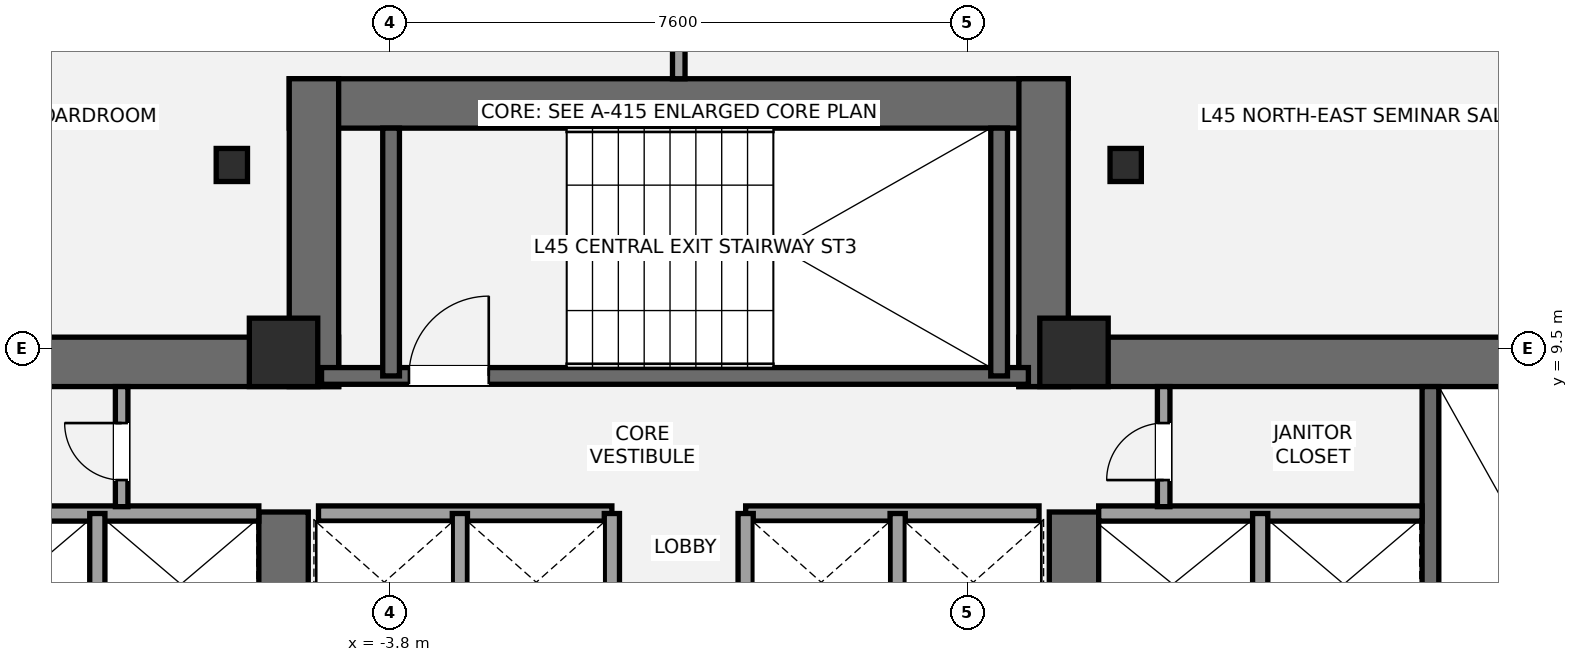
"""IFC4 building model, lengths in metres.
Left out: names, types, materials, properties, quantities, classifications, styles, units other than length and angle.
Written with IfcOpenShell. Run it as: python <this file> out.ifc"""

import sys

from ifc_helpers import new_model, si_unit, direction, frame, frame_2d, origin, origin_2d, place, context, subcontext, project, spatial, rectangle, i_section, extrude, element, fill, save


model = new_model("IFC4")
c1 = context("Model", 3, precision=1e-05, world=origin(), true_north=direction((0.0, 1.0)))
c2 = subcontext(c1, "Body", "Model", "MODEL_VIEW")
j1 = project(units=[si_unit("LENGTHUNIT", "METRE"), si_unit("PLANEANGLEUNIT", "RADIAN")], contexts=[c1])
p1 = place(None, origin())
s1 = spatial("IfcSite", under=j1, at=p1, CompositionType="ELEMENT")
p2 = place(p1, origin())
s2 = spatial("IfcBuilding", under=s1, at=p2, CompositionType="ELEMENT")
p3 = place(p2, frame((0.0, 0.0, 166.2)))
s3 = spatial("IfcBuildingStorey", under=s2, at=p3, CompositionType="ELEMENT", Elevation=166.2)
p4 = place(p3, frame((-13.8, 9.325, 0.0), z_axis=(0.0, 0.0, 1.0), x_axis=(1.0, 0.0, 0.0)))
e1 = element("IfcWall", 1, at=p4, inside=s3, PredefinedType="SHEAR", context=c2, shape_type="SweptSolid", body=[
    extrude(rectangle(XDim=9.325, YDim=0.65, at=frame_2d((4.663, 0.0))), origin(), (0.0, 0.0, 1.0), 3.2),
])
p5 = place(p3, frame((-5.2, 5.35, 0.0), z_axis=(0.0, 0.0, 1.0), x_axis=(0.0, 1.0, 0.0)))
e2 = element("IfcWall", 2, at=p5, inside=s3, PredefinedType="SHEAR", context=c2, shape_type="SweptSolid", body=[
    extrude(rectangle(XDim=2.0, YDim=0.65, at=frame_2d((1.0, 0.0))), origin(), (0.0, 0.0, 1.0), 3.2),
])
p6 = place(p3, frame((4.475, 9.325, 0.0), z_axis=(0.0, 0.0, 1.0), x_axis=(1.0, 0.0, 0.0)))
e3 = element("IfcWall", 3, at=p6, inside=s3, PredefinedType="SHEAR", context=c2, shape_type="SweptSolid", body=[
    extrude(rectangle(XDim=9.325, YDim=0.65, at=frame_2d((4.663, 0.0))), origin(), (0.0, 0.0, 1.0), 3.2),
])
p7 = place(p3, frame((5.2, 5.35, 0.0), z_axis=(0.0, 0.0, 1.0), x_axis=(0.0, 1.0, 0.0)))
e4 = element("IfcWall", 4, at=p7, inside=s3, PredefinedType="SHEAR", context=c2, shape_type="SweptSolid", body=[
    extrude(rectangle(XDim=2.0, YDim=0.65, at=frame_2d((1.0, 0.0))), origin(), (0.0, 0.0, 1.0), 3.2),
])
p8 = place(p3, frame((9.89, 1.85, 0.0), z_axis=(0.0, 0.0, 1.0), x_axis=(0.0, 1.0, 0.0)))
e5 = element("IfcWall", 5, at=p8, inside=s3, PredefinedType="SHEAR", context=c2, shape_type="SweptSolid", body=[
    extrude(rectangle(XDim=7.15, YDim=0.22, at=frame_2d((3.575, 0.0))), origin(), (0.0, 0.0, 1.0), 3.2),
])
p9 = place(p3, frame((-5.125, 12.725, 0.0), z_axis=(0.0, 0.0, 1.0), x_axis=(1.0, 0.0, 0.0)))
e6 = element("IfcWall", 6, at=p9, inside=s3, PredefinedType="SHEAR", context=c2, shape_type="SweptSolid", body=[
    extrude(rectangle(XDim=10.25, YDim=0.65, at=frame_2d((5.125, 0.0))), origin(), (0.0, 0.0, 1.0), 3.2),
])
for number, where, z_axis, x_axis in (
    (7, (-4.8, 9.0, 0.0), (0.0, 0.0, 1.0), (0.0, 1.0, 0.0)),
    (8, (4.8, 9.0, 0.0), (0.0, 0.0, 1.0), (0.0, 1.0, 0.0)),
):
    element("IfcWall", number, at=place(p3, frame(where, z_axis=z_axis, x_axis=x_axis)), inside=s3, PredefinedType="SHEAR", context=c2, shape_type="SweptSolid", body=[
        extrude(rectangle(XDim=4.05, YDim=0.65, at=frame_2d((2.025, 0.0))), origin(), (0.0, 0.0, 1.0), 3.2),
    ])
p10 = place(p3, frame((-4.7, 9.14, 0.0), z_axis=(0.0, 0.0, 1.0), x_axis=(1.0, 0.0, 0.0)))
e9 = element("IfcWall", 9, at=p10, inside=s3, PredefinedType="SHEAR", context=c2, shape_type="SweptSolid", body=[
    extrude(rectangle(XDim=9.3, YDim=0.22, at=frame_2d((4.65, 0.0))), origin(), (0.0, 0.0, 1.0), 3.2),
])
p11 = place(p10, frame((1.15, 0.0, 0.0)))
e10 = element("IfcOpeningElement", 10, at=p11, cuts=e9, PredefinedType="OPENING", context=c2, shape_type="SweptSolid", body=[
    extrude(rectangle(XDim=1.05, YDim=2.15, at=frame_2d((0.525, 1.075))), frame((0.0, 0.12, 0.0), z_axis=(0.0, -1.0, 0.0), x_axis=(1.0, 0.0, 0.0)), (0.0, 0.0, 1.0), 0.24),
])
for number, where, z_axis, x_axis in (
    (11, (-3.785, 9.14, 0.0), (0.0, 0.0, 1.0), (0.0, 1.0, 0.0)),
    (12, (4.215, 9.14, 0.0), (0.0, 0.0, 1.0), (0.0, 1.0, 0.0)),
):
    element("IfcWall", number, at=place(p3, frame(where, z_axis=z_axis, x_axis=x_axis)), inside=s3, PredefinedType="SHEAR", context=c2, shape_type="SweptSolid", body=[
        extrude(rectangle(XDim=3.26, YDim=0.22, at=frame_2d((1.63, 0.0))), origin(), (0.0, 0.0, 1.0), 3.2),
    ])
for number, where, z_axis, x_axis in (
    (13, (-5.2, 9.45, 0.0), (0.0, 0.0, 1.0), (1.0, 0.0, 0.0)),
    (14, (5.2, 9.45, 0.0), (0.0, 0.0, 1.0), (1.0, 0.0, 0.0)),
):
    element("IfcColumn", number, at=place(p3, frame(where, z_axis=z_axis, x_axis=x_axis)), inside=s3, PredefinedType="COLUMN", context=c2, shape_type="SweptSolid", body=[
        extrude(rectangle(XDim=0.9, YDim=0.9, at=origin_2d()), origin(), (0.0, 0.0, 1.0), 3.2),
    ])
for number, where, z_axis, x_axis in (
    (15, (5.88, 11.915, 0.0), (0.0, 0.0, 1.0), (1.0, 0.0, 0.0)),
    (16, (-5.88, 11.915, 0.0), (0.0, 0.0, 1.0), (1.0, 0.0, 0.0)),
):
    element("IfcColumn", number, at=place(p3, frame(where, z_axis=z_axis, x_axis=x_axis)), inside=s3, PredefinedType="COLUMN", context=c2, shape_type="SweptSolid", body=[
        extrude(i_section(OverallWidth=0.412, OverallDepth=0.435, WebThickness=0.036, FlangeThickness=0.057, at=origin_2d()), origin(), (0.0, 0.0, 1.0), 3.2),
    ])
p12 = place(p3, frame((-9.78, 7.33, 0.0), z_axis=(0.0, 0.0, 1.0), x_axis=(1.0, 0.0, 0.0)))
e17 = element("IfcWall", 17, at=p12, inside=s3, PredefinedType="SOLIDWALL", context=c2, shape_type="SweptSolid", body=[
    extrude(rectangle(XDim=4.255, YDim=0.2, at=frame_2d((2.127, 0.0))), origin(), (0.0, 0.0, 1.0), 3.02),
])
p13 = place(p3, frame((-7.65, 5.47, 0.0), z_axis=(0.0, 0.0, 1.0), x_axis=(0.0, 1.0, 0.0)))
e18 = element("IfcWall", 18, at=p13, inside=s3, PredefinedType="SOLIDWALL", context=c2, shape_type="SweptSolid", body=[
    extrude(rectangle(XDim=1.86, YDim=0.2, at=frame_2d((0.93, 0.0))), origin(), (0.0, 0.0, 1.0), 3.02),
])
p14 = place(p3, frame((5.525, 7.33, 0.0), z_axis=(0.0, 0.0, 1.0), x_axis=(1.0, 0.0, 0.0)))
e19 = element("IfcWall", 19, at=p14, inside=s3, PredefinedType="SOLIDWALL", context=c2, shape_type="SweptSolid", body=[
    extrude(rectangle(XDim=4.255, YDim=0.2, at=frame_2d((2.127, 0.0))), origin(), (0.0, 0.0, 1.0), 3.02),
])
p15 = place(p3, frame((7.65, 5.47, 0.0), z_axis=(0.0, 0.0, 1.0), x_axis=(0.0, 1.0, 0.0)))
e20 = element("IfcWall", 20, at=p15, inside=s3, PredefinedType="SOLIDWALL", context=c2, shape_type="SweptSolid", body=[
    extrude(rectangle(XDim=1.86, YDim=0.2, at=frame_2d((0.93, 0.0))), origin(), (0.0, 0.0, 1.0), 3.02),
])
for number, where, z_axis, x_axis in (
    (21, (-4.74, 7.33, 0.0), (0.0, 0.0, 1.0), (1.0, 0.0, 0.0)),
    (22, (0.88, 7.33, 0.0), (0.0, 0.0, 1.0), (1.0, 0.0, 0.0)),
):
    element("IfcWall", number, at=place(p3, frame(where, z_axis=z_axis, x_axis=x_axis)), inside=s3, PredefinedType="SOLIDWALL", context=c2, shape_type="SweptSolid", body=[
        extrude(rectangle(XDim=3.86, YDim=0.2, at=frame_2d((1.93, 0.0))), origin(), (0.0, 0.0, 1.0), 3.02),
    ])
for number, where, z_axis, x_axis in (
    (23, (-2.88, 5.52, 0.0), (0.0, 0.0, 1.0), (0.0, 1.0, 0.0)),
    (24, (2.88, 5.52, 0.0), (0.0, 0.0, 1.0), (0.0, 1.0, 0.0)),
    (25, (-0.88, 5.52, 0.0), (0.0, 0.0, 1.0), (0.0, 1.0, 0.0)),
    (26, (0.88, 5.52, 0.0), (0.0, 0.0, 1.0), (0.0, 1.0, 0.0)),
):
    element("IfcWall", number, at=place(p3, frame(where, z_axis=z_axis, x_axis=x_axis)), inside=s3, PredefinedType="SOLIDWALL", context=c2, shape_type="SweptSolid", body=[
        extrude(rectangle(XDim=1.81, YDim=0.2, at=frame_2d((0.905, 0.0))), origin(), (0.0, 0.0, 1.0), 3.02),
    ])
p16 = place(p3, frame((-7.33, 7.42, 0.0), z_axis=(0.0, 0.0, 1.0), x_axis=(0.0, 1.0, 0.0)))
e27 = element("IfcWall", 27, at=p16, inside=s3, PredefinedType="PARTITIONING", context=c2, shape_type="SweptSolid", body=[
    extrude(rectangle(XDim=1.58, YDim=0.165, at=frame_2d((0.79, 0.0))), origin(), (0.0, 0.0, 1.0), 3.02),
])
p17 = place(p16, frame((0.35, 0.0, 0.0)))
e28 = element("IfcOpeningElement", 28, at=p17, cuts=e27, PredefinedType="OPENING", context=c2, shape_type="SweptSolid", body=[
    extrude(rectangle(XDim=0.75, YDim=2.1, at=frame_2d((0.375, 1.05))), frame((0.0, 0.093, 0.0), z_axis=(0.0, -1.0, 0.0), x_axis=(1.0, 0.0, 0.0)), (0.0, 0.0, 1.0), 0.185),
])
p18 = place(p3, frame((6.38, 7.42, 0.0), z_axis=(0.0, 0.0, 1.0), x_axis=(0.0, 1.0, 0.0)))
e29 = element("IfcWall", 29, at=p18, inside=s3, PredefinedType="PARTITIONING", context=c2, shape_type="SweptSolid", body=[
    extrude(rectangle(XDim=1.58, YDim=0.165, at=frame_2d((0.79, 0.0))), origin(), (0.0, 0.0, 1.0), 3.02),
])
p19 = place(p18, frame((0.35, 0.0, 0.0)))
e30 = element("IfcOpeningElement", 30, at=p19, cuts=e29, PredefinedType="OPENING", context=c2, shape_type="SweptSolid", body=[
    extrude(rectangle(XDim=0.75, YDim=2.1, at=frame_2d((0.375, 1.05))), frame((0.0, 0.093, 0.0), z_axis=(0.0, -1.0, 0.0), x_axis=(1.0, 0.0, 0.0)), (0.0, 0.0, 1.0), 0.185),
])
p20 = place(p3, frame((0.0, 13.05, 0.0), z_axis=(0.0, 0.0, 1.0), x_axis=(0.0, 1.0, 0.0)))
e31 = element("IfcWall", 31, at=p20, inside=s3, PredefinedType="PARTITIONING", context=c2, shape_type="SweptSolid", body=[
    extrude(rectangle(XDim=3.29, YDim=0.165, at=frame_2d((1.645, 0.0))), origin(), (0.0, 0.0, 1.0), 3.02),
])
p21 = place(p11, origin())
e32 = element("IfcDoor", 32, at=p21, inside=s3, OperationType="SINGLE_SWING_RIGHT", PredefinedType="DOOR", context=c2, shape_type="SweptSolid", body=[
    extrude(rectangle(XDim=1.05, YDim=2.15, at=frame_2d((0.525, 1.075))), frame((0.0, 0.025, 0.0), z_axis=(0.0, -1.0, 0.0), x_axis=(1.0, 0.0, 0.0)), (0.0, 0.0, 1.0), 0.05),
])
fill(e10, e32)
p22 = place(p17, origin())
e33 = element("IfcDoor", 33, at=p22, inside=s3, OperationType="SINGLE_SWING_RIGHT", PredefinedType="DOOR", context=c2, shape_type="SweptSolid", body=[
    extrude(rectangle(XDim=0.75, YDim=2.1, at=frame_2d((0.375, 1.05))), frame((0.0, 0.025, 0.0), z_axis=(0.0, -1.0, 0.0), x_axis=(1.0, 0.0, 0.0)), (0.0, 0.0, 1.0), 0.05),
])
fill(e28, e33)
p23 = place(p19, origin())
e34 = element("IfcDoor", 34, at=p23, inside=s3, OperationType="SINGLE_SWING_LEFT", PredefinedType="DOOR", context=c2, shape_type="SweptSolid", body=[
    extrude(rectangle(XDim=0.75, YDim=2.1, at=frame_2d((0.375, 1.05))), frame((0.0, 0.025, 0.0), z_axis=(0.0, -1.0, 0.0), x_axis=(1.0, 0.0, 0.0)), (0.0, 0.0, 1.0), 0.05),
])
fill(e30, e34)
save(model, sys.argv[1])
